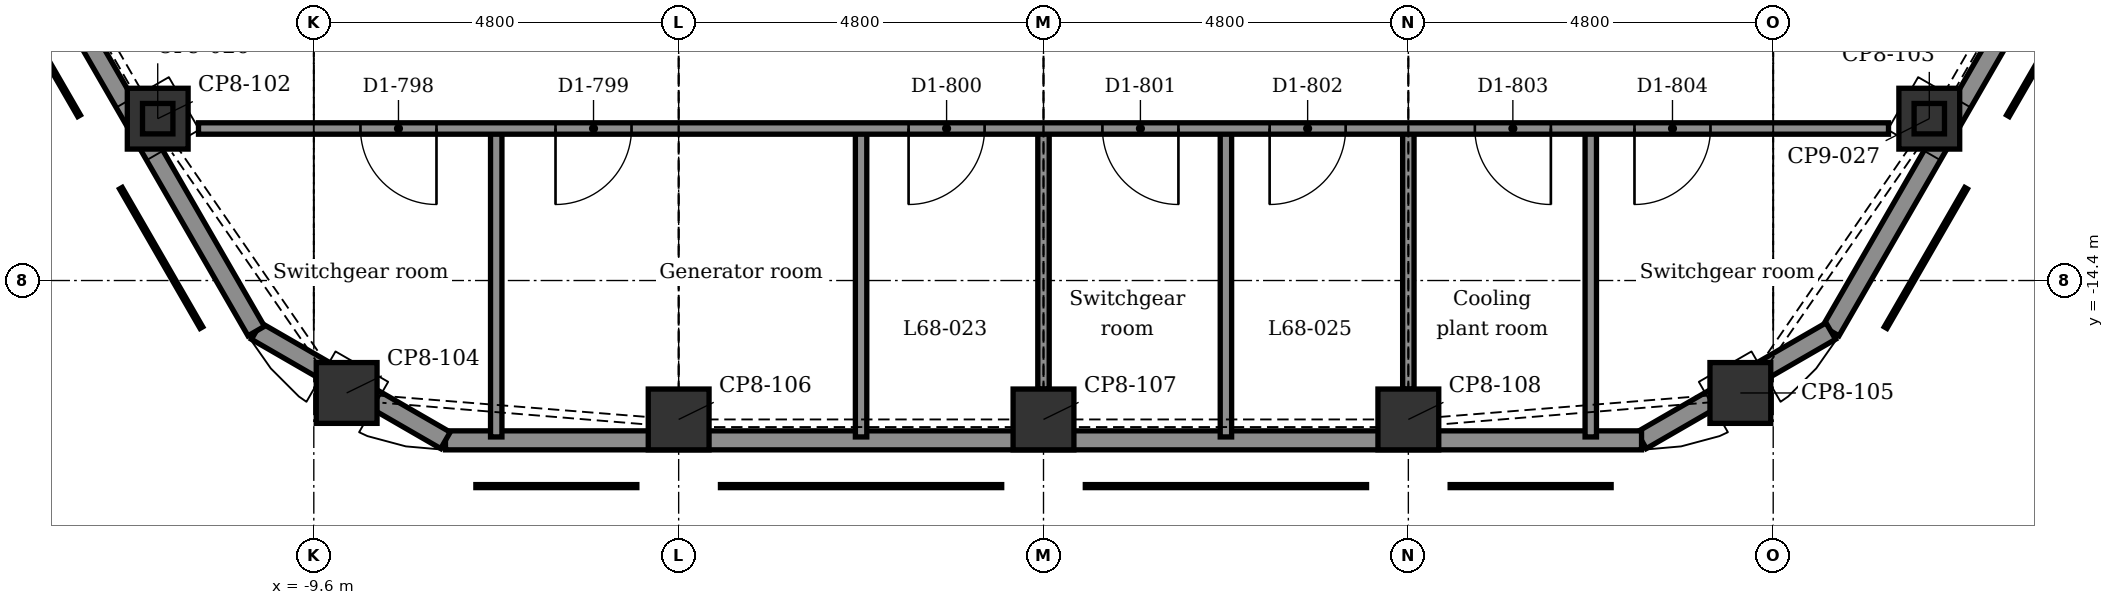
"""IFC4 building model, lengths in metres.
Left out: names, types, materials, properties, quantities, classifications, styles, units other than length and angle.
Written with IfcOpenShell. Run it as: python <this file> out.ifc"""

import sys

from ifc_helpers import new_model, si_unit, direction, frame, frame_2d, origin, origin_2d, place, context, subcontext, project, spatial, polyline, rectangle, hollow_rectangle, outline, extrude, element, fill, save


model = new_model("IFC4")
c1 = context("Model", 3, precision=1e-05, world=origin(), true_north=direction((0.0, 1.0)))
c2 = subcontext(c1, "Body", "Model", "MODEL_VIEW")
j1 = project(units=[si_unit("LENGTHUNIT", "METRE"), si_unit("PLANEANGLEUNIT", "RADIAN")], contexts=[c1])
p1 = place(None, origin())
s1 = spatial("IfcSite", under=j1, at=p1, CompositionType="ELEMENT")
p2 = place(p1, origin())
s2 = spatial("IfcBuilding", under=s1, at=p2, CompositionType="ELEMENT")
p3 = place(p2, frame((0.0, 0.0, 301.9)))
s3 = spatial("IfcBuildingStorey", under=s2, at=p3, CompositionType="ELEMENT", Elevation=301.9)
for number, where, z_axis, x_axis in (
    (1, (11.654, -12.271, -0.3), (0.0, 0.0, 1.0), (0.5, 0.866, 0.0)),
    (2, (9.168, -15.879, -0.3), (0.0, 0.0, 1.0), (0.866, 0.5, 0.0)),
    (3, (4.8, -16.228, -0.3), (0.0, 0.0, 1.0), (1.0, 0.0, 0.0)),
    (4, (0.0, -16.228, -0.3), (0.0, 0.0, 1.0), (1.0, 0.0, 0.0)),
    (5, (-4.8, -16.228, -0.3), (0.0, 0.0, 1.0), (1.0, 0.0, 0.0)),
    (6, (-9.168, -15.879, -0.3), (0.0, 0.0, 1.0), (0.5, 0.866, 0.0)),
    (7, (-11.654, -12.271, -0.3), (0.0, 0.0, 1.0), (0.866, 0.5, 0.0)),
):
    element("IfcColumn", number, at=place(p3, frame(where, z_axis=z_axis, x_axis=x_axis)), inside=s3, PredefinedType="COLUMN", context=c2, shape_type="SweptSolid", body=[
        extrude(rectangle(XDim=0.8, YDim=0.8, at=origin_2d()), origin(), (0.0, 0.0, 1.0), 5.3),
    ])
for number, where, z_axis, x_axis in (
    (8, (11.654, -12.271, 5.0), (0.0, 0.0, 1.0), (1.0, 0.0, 0.0)),
    (9, (-11.654, -12.271, 5.0), (0.0, 0.0, 1.0), (1.0, 0.0, 0.0)),
):
    element("IfcColumn", number, at=place(p3, frame(where, z_axis=z_axis, x_axis=x_axis)), inside=s3, PredefinedType="COLUMN", context=c2, shape_type="SweptSolid", body=[
        extrude(hollow_rectangle(XDim=0.4, YDim=0.4, WallThickness=0.02, at=origin_2d()), origin(), (0.0, 0.0, 1.0), 2.178),
    ])
p4 = place(p3, frame((18.226, -1.438, 0.0), z_axis=(0.0, 0.0, 1.0), x_axis=(-0.500010301671, -0.86601945603, 0.0)))
e10 = element("IfcWall", 10, at=p4, inside=s3, PredefinedType="SOLIDWALL", context=c2, shape_type="SweptSolid", body=[
    extrude(outline(polyline([(0.0, 0.0), (15.736, 0.0), (15.736, 5.682), (0.0, 14.197), (0.0, 0.0)])), frame((0.0, 0.125, 0.0), z_axis=(0.0, -1.0, 0.0), x_axis=(1.0, 0.0, 0.0)), (0.0, 0.0, 1.0), 0.25),
])
p5 = place(p4, frame((4.268, 0.0, 5.8)))
e11 = element("IfcOpeningElement", 11, at=p5, cuts=e10, PredefinedType="OPENING", context=c2, shape_type="SweptSolid", body=[
    extrude(rectangle(XDim=2.4, YDim=3.6, at=frame_2d((1.2, 1.8))), frame((0.0, 0.135, 0.0), z_axis=(0.0, -1.0, 0.0), x_axis=(1.0, 0.0, 0.0)), (0.0, 0.0, 1.0), 0.27),
])
p6 = place(p4, frame((4.268, 0.0, 1.0)))
e12 = element("IfcOpeningElement", 12, at=p6, cuts=e10, PredefinedType="OPENING", context=c2, shape_type="SweptSolid", body=[
    extrude(rectangle(XDim=2.4, YDim=3.0, at=frame_2d((1.2, 1.5))), frame((0.0, 0.135, 0.0), z_axis=(0.0, -1.0, 0.0), x_axis=(1.0, 0.0, 0.0)), (0.0, 0.0, 1.0), 0.27),
])
p7 = place(p3, frame((10.358, -15.065, 0.0), z_axis=(0.0, 0.0, 1.0), x_axis=(-0.866018712932, -0.500011588718, 0.0)))
e13 = element("IfcWall", 13, at=p7, inside=s3, PredefinedType="SOLIDWALL", context=c2, shape_type="SweptSolid", body=[
    extrude(outline(polyline([(0.0, 0.0), (2.875, 0.0), (2.875, 4.783), (0.0, 5.682), (0.0, 0.0)])), frame((0.0, 0.125, 0.0), z_axis=(0.0, -1.0, 0.0), x_axis=(1.0, 0.0, 0.0)), (0.0, 0.0, 1.0), 0.25),
])
p8 = place(p3, frame((7.868, -16.503, 0.0), z_axis=(0.0, 0.0, 1.0), x_axis=(-1.0, 0.0, 0.0)))
e14 = element("IfcWall", 14, at=p8, inside=s3, PredefinedType="SOLIDWALL", context=c2, shape_type="SweptSolid", body=[
    extrude(outline(polyline([(0.0, 0.0), (15.736, 0.0), (15.736, 4.783), (0.0, 4.783), (0.0, 0.0)])), frame((0.0, 0.125, 0.0), z_axis=(0.0, -1.0, 0.0), x_axis=(1.0, 0.0, 0.0)), (0.0, 0.0, 1.0), 0.25),
])
p9 = place(p3, frame((-7.868, -16.503, 0.0), z_axis=(0.0, 0.0, 1.0), x_axis=(-0.866018712932, 0.500011588718, 0.0)))
e15 = element("IfcWall", 15, at=p9, inside=s3, PredefinedType="SOLIDWALL", context=c2, shape_type="SweptSolid", body=[
    extrude(outline(polyline([(0.0, 0.0), (2.875, 0.0), (2.875, 5.682), (0.0, 4.783), (0.0, 0.0)])), frame((0.0, 0.125, 0.0), z_axis=(0.0, -1.0, 0.0), x_axis=(1.0, 0.0, 0.0)), (0.0, 0.0, 1.0), 0.25),
])
p10 = place(p3, frame((-10.358, -15.065, 0.0), z_axis=(0.0, 0.0, 1.0), x_axis=(-0.500010301671, 0.86601945603, 0.0)))
e16 = element("IfcWall", 16, at=p10, inside=s3, PredefinedType="SOLIDWALL", context=c2, shape_type="SweptSolid", body=[
    extrude(outline(polyline([(0.0, 0.0), (15.736, 0.0), (15.736, 14.197), (0.0, 5.682), (0.0, 0.0)])), frame((0.0, 0.125, 0.0), z_axis=(0.0, -1.0, 0.0), x_axis=(1.0, 0.0, 0.0)), (0.0, 0.0, 1.0), 0.25),
])
p11 = place(p10, frame((9.068, 0.0, 5.8)))
e17 = element("IfcOpeningElement", 17, at=p11, cuts=e16, PredefinedType="OPENING", context=c2, shape_type="SweptSolid", body=[
    extrude(rectangle(XDim=2.4, YDim=3.6, at=frame_2d((1.2, 1.8))), frame((0.0, 0.135, 0.0), z_axis=(0.0, -1.0, 0.0), x_axis=(1.0, 0.0, 0.0)), (0.0, 0.0, 1.0), 0.27),
])
p12 = place(p10, frame((9.068, 0.0, 1.0)))
e18 = element("IfcOpeningElement", 18, at=p12, cuts=e16, PredefinedType="OPENING", context=c2, shape_type="SweptSolid", body=[
    extrude(rectangle(XDim=2.4, YDim=3.0, at=frame_2d((1.2, 1.5))), frame((0.0, 0.135, 0.0), z_axis=(0.0, -1.0, 0.0), x_axis=(1.0, 0.0, 0.0)), (0.0, 0.0, 1.0), 0.27),
])
p13 = place(p3, frame((7.2, -16.458, 0.0), z_axis=(0.0, 0.0, 1.0), x_axis=(0.0, 1.0, 0.0)))
e19 = element("IfcWall", 19, at=p13, inside=s3, PredefinedType="PARTITIONING", context=c2, shape_type="SweptSolid", body=[
    extrude(rectangle(XDim=4.058, YDim=0.15, at=frame_2d((2.029, 0.0))), origin(), (0.0, 0.0, 1.0), 5.0),
])
p14 = place(p3, frame((4.8, -15.828, 0.0), z_axis=(0.0, 0.0, 1.0), x_axis=(0.0, 1.0, 0.0)))
e20 = element("IfcWall", 20, at=p14, inside=s3, PredefinedType="PARTITIONING", context=c2, shape_type="SweptSolid", body=[
    extrude(rectangle(XDim=3.428, YDim=0.15, at=frame_2d((1.714, 0.0))), origin(), (0.0, 0.0, 1.0), 5.0),
])
p15 = place(p3, frame((2.4, -16.458, 0.0), z_axis=(0.0, 0.0, 1.0), x_axis=(0.0, 1.0, 0.0)))
e21 = element("IfcWall", 21, at=p15, inside=s3, PredefinedType="PARTITIONING", context=c2, shape_type="SweptSolid", body=[
    extrude(rectangle(XDim=4.058, YDim=0.15, at=frame_2d((2.029, 0.0))), origin(), (0.0, 0.0, 1.0), 5.0),
])
p16 = place(p3, frame((0.0, -15.828, 0.0), z_axis=(0.0, 0.0, 1.0), x_axis=(0.0, 1.0, 0.0)))
e22 = element("IfcWall", 22, at=p16, inside=s3, PredefinedType="PARTITIONING", context=c2, shape_type="SweptSolid", body=[
    extrude(rectangle(XDim=3.428, YDim=0.15, at=frame_2d((1.714, 0.0))), origin(), (0.0, 0.0, 1.0), 5.0),
])
for number, where, z_axis, x_axis in (
    (23, (-2.4, -16.458, 0.0), (0.0, 0.0, 1.0), (0.0, 1.0, 0.0)),
    (24, (-7.2, -16.458, 0.0), (0.0, 0.0, 1.0), (0.0, 1.0, 0.0)),
):
    element("IfcWall", number, at=place(p3, frame(where, z_axis=z_axis, x_axis=x_axis)), inside=s3, PredefinedType="PARTITIONING", context=c2, shape_type="SweptSolid", body=[
        extrude(rectangle(XDim=4.058, YDim=0.15, at=frame_2d((2.029, 0.0))), origin(), (0.0, 0.0, 1.0), 5.0),
    ])
p17 = place(p3, frame((-11.117, -12.4, 0.0), z_axis=(0.0, 0.0, 1.0), x_axis=(1.0, 0.0, 0.0)))
e25 = element("IfcWall", 25, at=p17, inside=s3, PredefinedType="PARTITIONING", context=c2, shape_type="SweptSolid", body=[
    extrude(rectangle(XDim=22.234, YDim=0.15, at=frame_2d((11.117, 0.0))), origin(), (0.0, 0.0, 1.0), 5.0),
])
p18 = place(p17, frame((2.131, 0.0, 0.0)))
e26 = element("IfcOpeningElement", 26, at=p18, cuts=e25, PredefinedType="OPENING", context=c2, shape_type="SweptSolid", body=[
    extrude(rectangle(XDim=1.0, YDim=2.1, at=frame_2d((0.5, 1.05))), frame((0.0, 0.085, 0.0), z_axis=(0.0, -1.0, 0.0), x_axis=(1.0, 0.0, 0.0)), (0.0, 0.0, 1.0), 0.17),
])
p19 = place(p17, frame((4.697, 0.0, 0.0)))
e27 = element("IfcOpeningElement", 27, at=p19, cuts=e25, PredefinedType="OPENING", context=c2, shape_type="SweptSolid", body=[
    extrude(rectangle(XDim=1.0, YDim=2.1, at=frame_2d((0.5, 1.05))), frame((0.0, 0.085, 0.0), z_axis=(0.0, -1.0, 0.0), x_axis=(1.0, 0.0, 0.0)), (0.0, 0.0, 1.0), 0.17),
])
p20 = place(p17, frame((9.342, 0.0, 0.0)))
e28 = element("IfcOpeningElement", 28, at=p20, cuts=e25, PredefinedType="OPENING", context=c2, shape_type="SweptSolid", body=[
    extrude(rectangle(XDim=1.0, YDim=2.1, at=frame_2d((0.5, 1.05))), frame((0.0, 0.085, 0.0), z_axis=(0.0, -1.0, 0.0), x_axis=(1.0, 0.0, 0.0)), (0.0, 0.0, 1.0), 0.17),
])
p21 = place(p17, frame((11.892, 0.0, 0.0)))
e29 = element("IfcOpeningElement", 29, at=p21, cuts=e25, PredefinedType="OPENING", context=c2, shape_type="SweptSolid", body=[
    extrude(rectangle(XDim=1.0, YDim=2.1, at=frame_2d((0.5, 1.05))), frame((0.0, 0.085, 0.0), z_axis=(0.0, -1.0, 0.0), x_axis=(1.0, 0.0, 0.0)), (0.0, 0.0, 1.0), 0.17),
])
p22 = place(p17, frame((14.092, 0.0, 0.0)))
e30 = element("IfcOpeningElement", 30, at=p22, cuts=e25, PredefinedType="OPENING", context=c2, shape_type="SweptSolid", body=[
    extrude(rectangle(XDim=1.0, YDim=2.1, at=frame_2d((0.5, 1.05))), frame((0.0, 0.085, 0.0), z_axis=(0.0, -1.0, 0.0), x_axis=(1.0, 0.0, 0.0)), (0.0, 0.0, 1.0), 0.17),
])
p23 = place(p17, frame((16.792, 0.0, 0.0)))
e31 = element("IfcOpeningElement", 31, at=p23, cuts=e25, PredefinedType="OPENING", context=c2, shape_type="SweptSolid", body=[
    extrude(rectangle(XDim=1.0, YDim=2.1, at=frame_2d((0.5, 1.05))), frame((0.0, 0.085, 0.0), z_axis=(0.0, -1.0, 0.0), x_axis=(1.0, 0.0, 0.0)), (0.0, 0.0, 1.0), 0.17),
])
p24 = place(p17, frame((18.892, 0.0, 0.0)))
e32 = element("IfcOpeningElement", 32, at=p24, cuts=e25, PredefinedType="OPENING", context=c2, shape_type="SweptSolid", body=[
    extrude(rectangle(XDim=1.0, YDim=2.1, at=frame_2d((0.5, 1.05))), frame((0.0, 0.085, 0.0), z_axis=(0.0, -1.0, 0.0), x_axis=(1.0, 0.0, 0.0)), (0.0, 0.0, 1.0), 0.17),
])
p25 = place(p18, frame((1.0, 0.0, 0.0), z_axis=(0.0, 0.0, 1.0), x_axis=(-1.0, 0.0, 0.0)))
e33 = element("IfcDoor", 33, at=p25, inside=s3, OperationType="SINGLE_SWING_RIGHT", PredefinedType="DOOR", context=c2, shape_type="SweptSolid", body=[
    extrude(rectangle(XDim=1.0, YDim=2.1, at=frame_2d((0.5, 1.05))), frame((0.0, 0.025, 0.0), z_axis=(0.0, -1.0, 0.0), x_axis=(1.0, 0.0, 0.0)), (0.0, 0.0, 1.0), 0.05),
])
fill(e26, e33)
p26 = place(p19, frame((1.0, 0.0, 0.0), z_axis=(0.0, 0.0, 1.0), x_axis=(-1.0, 0.0, 0.0)))
e34 = element("IfcDoor", 34, at=p26, inside=s3, OperationType="SINGLE_SWING_LEFT", PredefinedType="DOOR", context=c2, shape_type="SweptSolid", body=[
    extrude(rectangle(XDim=1.0, YDim=2.1, at=frame_2d((0.5, 1.05))), frame((0.0, 0.025, 0.0), z_axis=(0.0, -1.0, 0.0), x_axis=(1.0, 0.0, 0.0)), (0.0, 0.0, 1.0), 0.05),
])
fill(e27, e34)
p27 = place(p20, frame((1.0, 0.0, 0.0), z_axis=(0.0, 0.0, 1.0), x_axis=(-1.0, 0.0, 0.0)))
e35 = element("IfcDoor", 35, at=p27, inside=s3, OperationType="SINGLE_SWING_LEFT", PredefinedType="DOOR", context=c2, shape_type="SweptSolid", body=[
    extrude(rectangle(XDim=1.0, YDim=2.1, at=frame_2d((0.5, 1.05))), frame((0.0, 0.025, 0.0), z_axis=(0.0, -1.0, 0.0), x_axis=(1.0, 0.0, 0.0)), (0.0, 0.0, 1.0), 0.05),
])
fill(e28, e35)
p28 = place(p21, frame((1.0, 0.0, 0.0), z_axis=(0.0, 0.0, 1.0), x_axis=(-1.0, 0.0, 0.0)))
e36 = element("IfcDoor", 36, at=p28, inside=s3, OperationType="SINGLE_SWING_RIGHT", PredefinedType="DOOR", context=c2, shape_type="SweptSolid", body=[
    extrude(rectangle(XDim=1.0, YDim=2.1, at=frame_2d((0.5, 1.05))), frame((0.0, 0.025, 0.0), z_axis=(0.0, -1.0, 0.0), x_axis=(1.0, 0.0, 0.0)), (0.0, 0.0, 1.0), 0.05),
])
fill(e29, e36)
p29 = place(p22, frame((1.0, 0.0, 0.0), z_axis=(0.0, 0.0, 1.0), x_axis=(-1.0, 0.0, 0.0)))
e37 = element("IfcDoor", 37, at=p29, inside=s3, OperationType="SINGLE_SWING_LEFT", PredefinedType="DOOR", context=c2, shape_type="SweptSolid", body=[
    extrude(rectangle(XDim=1.0, YDim=2.1, at=frame_2d((0.5, 1.05))), frame((0.0, 0.025, 0.0), z_axis=(0.0, -1.0, 0.0), x_axis=(1.0, 0.0, 0.0)), (0.0, 0.0, 1.0), 0.05),
])
fill(e30, e37)
p30 = place(p23, frame((1.0, 0.0, 0.0), z_axis=(0.0, 0.0, 1.0), x_axis=(-1.0, 0.0, 0.0)))
e38 = element("IfcDoor", 38, at=p30, inside=s3, OperationType="SINGLE_SWING_RIGHT", PredefinedType="DOOR", context=c2, shape_type="SweptSolid", body=[
    extrude(rectangle(XDim=1.0, YDim=2.1, at=frame_2d((0.5, 1.05))), frame((0.0, 0.025, 0.0), z_axis=(0.0, -1.0, 0.0), x_axis=(1.0, 0.0, 0.0)), (0.0, 0.0, 1.0), 0.05),
])
fill(e31, e38)
p31 = place(p24, frame((1.0, 0.0, 0.0), z_axis=(0.0, 0.0, 1.0), x_axis=(-1.0, 0.0, 0.0)))
e39 = element("IfcDoor", 39, at=p31, inside=s3, OperationType="SINGLE_SWING_LEFT", PredefinedType="DOOR", context=c2, shape_type="SweptSolid", body=[
    extrude(rectangle(XDim=1.0, YDim=2.1, at=frame_2d((0.5, 1.05))), frame((0.0, 0.025, 0.0), z_axis=(0.0, -1.0, 0.0), x_axis=(1.0, 0.0, 0.0)), (0.0, 0.0, 1.0), 0.05),
])
fill(e32, e39)
save(model, sys.argv[1])
